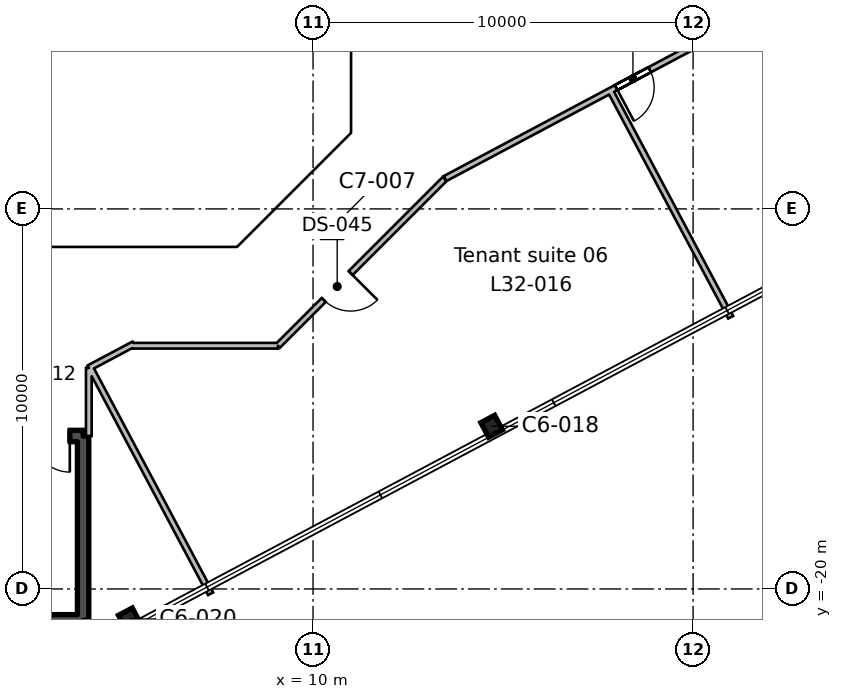
"""IFC4 building model, lengths in metres.
Left out: names, types, materials, properties, quantities, classifications, styles, units other than length and angle.
Written with IfcOpenShell. Run it as: python <this file> out.ifc"""

import sys

from ifc_helpers import new_model, si_unit, direction, frame, frame_2d, origin, origin_2d, place, context, subcontext, project, spatial, rectangle, hollow_rectangle, i_section, extrude, element, fill, save


model = new_model("IFC4")
c1 = context("Model", 3, precision=1e-05, world=origin(), true_north=direction((0.0, 1.0)))
c2 = subcontext(c1, "Body", "Model", "MODEL_VIEW")
j1 = project(units=[si_unit("LENGTHUNIT", "METRE"), si_unit("PLANEANGLEUNIT", "RADIAN")], contexts=[c1])
p1 = place(None, origin())
s1 = spatial("IfcSite", under=j1, at=p1, CompositionType="ELEMENT")
p2 = place(p1, origin())
s2 = spatial("IfcBuilding", under=s1, at=p2, CompositionType="ELEMENT")
p3 = place(p2, frame((0.0, 0.0, 154.2)))
s3 = spatial("IfcBuildingStorey", under=s2, at=p3, CompositionType="ELEMENT", Elevation=154.2)
for number, where, z_axis, x_axis in (
    (1, (5.164, -20.789, 0.0), (0.0, 0.0, 1.0), (0.883, 0.469, 0.0)),
    (2, (14.7, -15.719, 0.0), (0.0, 0.0, 1.0), (0.883, 0.469, 0.0)),
):
    element("IfcColumn", number, at=place(p3, frame(where, z_axis=z_axis, x_axis=x_axis)), inside=s3, PredefinedType="COLUMN", context=c2, shape_type="SweptSolid", body=[
        extrude(i_section(OverallWidth=0.412, OverallDepth=0.434, WebThickness=0.036, FlangeThickness=0.057, FilletRadius=0.015, at=origin_2d()), origin(), (0.0, 0.0, 1.0), 4.0),
    ])
p4 = place(p3, frame((10.5, -10.5, 0.0), z_axis=(0.0, 0.0, 1.0), x_axis=(1.0, 0.0, 0.0)))
e3 = element("IfcColumn", 3, at=p4, inside=s3, PredefinedType="COLUMN", context=c2, shape_type="SweptSolid", body=[
    extrude(hollow_rectangle(XDim=0.508, YDim=0.508, WallThickness=0.012, InnerFilletRadius=0.006, OuterFilletRadius=0.018, at=origin_2d()), origin(), (0.0, 0.0, 1.0), 4.0),
])
p5 = place(p3, frame((3.95, -15.975, 0.0), z_axis=(0.0, 0.0, 1.0), x_axis=(0.0, -1.0, 0.0)))
e4 = element("IfcWall", 4, at=p5, inside=s3, PredefinedType="SHEAR", context=c2, shape_type="SweptSolid", body=[
    extrude(rectangle(XDim=4.85, YDim=0.3, at=frame_2d((2.425, 0.0))), origin(), (0.0, 0.0, 1.0), 4.0),
])
p6 = place(p3, frame((3.95, -20.825, 0.0), z_axis=(0.0, 0.0, 1.0), x_axis=(-1.0, 0.0, 0.0)))
e5 = element("IfcWall", 5, at=p6, inside=s3, PredefinedType="SHEAR", context=c2, shape_type="SweptSolid", body=[
    extrude(rectangle(XDim=8.3, YDim=0.3, at=frame_2d((4.15, 0.0))), origin(), (0.0, 0.0, 1.0), 4.0),
])
p7 = place(p3, frame((-4.35, -15.975, 0.0), z_axis=(0.0, 0.0, 1.0), x_axis=(1.0, 0.0, 0.0)))
e6 = element("IfcWall", 6, at=p7, inside=s3, PredefinedType="SHEAR", context=c2, shape_type="SweptSolid", body=[
    extrude(rectangle(XDim=8.3, YDim=0.3, at=frame_2d((4.15, 0.0))), origin(), (0.0, 0.0, 1.0), 4.0),
])
p8 = place(p7, frame((6.05, 0.0, 0.0)))
e7 = element("IfcOpeningElement", 7, at=p8, cuts=e6, PredefinedType="OPENING", context=c2, shape_type="SweptSolid", body=[
    extrude(rectangle(XDim=1.9, YDim=2.1, at=frame_2d((0.95, 1.05))), frame((0.0, 0.16, 0.0), z_axis=(0.0, -1.0, 0.0), x_axis=(1.0, 0.0, 0.0)), (0.0, 0.0, 1.0), 0.32),
])
p9 = place(p3, frame((5.284, -13.556, 0.0), z_axis=(0.0, 0.0, 1.0), x_axis=(-0.882740669896, -0.469860521551, 0.0)))
e8 = element("IfcWall", 8, at=p9, inside=s3, PredefinedType="PARTITIONING", context=c2, shape_type="SweptSolid", body=[
    extrude(rectangle(XDim=1.341, YDim=0.15, at=frame_2d((0.67, 0.0))), origin(), (0.0, 0.0, 1.0), 3.64),
])
p10 = place(p3, frame((4.1, -14.186, 0.0), z_axis=(0.0, 0.0, 1.0), x_axis=(0.0, -1.0, 0.0)))
e9 = element("IfcWall", 9, at=p10, inside=s3, PredefinedType="PARTITIONING", context=c2, shape_type="SweptSolid", body=[
    extrude(rectangle(XDim=1.789, YDim=0.15, at=frame_2d((0.895, 0.0))), origin(), (0.0, 0.0, 1.0), 3.64),
])
p11 = place(p3, frame((13.461, -9.216, 0.0), z_axis=(0.0, 0.0, 1.0), x_axis=(-0.707106781187, -0.707106781187, 0.0)))
e10 = element("IfcWall", 10, at=p11, inside=s3, PredefinedType="PARTITIONING", context=c2, shape_type="SweptSolid", body=[
    extrude(rectangle(XDim=6.201, YDim=0.15, at=frame_2d((3.1, 0.0))), origin(), (0.0, 0.0, 1.0), 3.64),
])
p12 = place(p11, frame((3.497, 0.0, 0.0)))
e11 = element("IfcOpeningElement", 11, at=p12, cuts=e10, PredefinedType="OPENING", context=c2, shape_type="SweptSolid", body=[
    extrude(rectangle(XDim=1.0, YDim=2.1, at=frame_2d((0.5, 1.05))), frame((0.0, 0.085, 0.0), z_axis=(0.0, -1.0, 0.0), x_axis=(1.0, 0.0, 0.0)), (0.0, 0.0, 1.0), 0.17),
])
p13 = place(p3, frame((9.077, -13.6, 0.0), z_axis=(0.0, 0.0, 1.0), x_axis=(-1.0, 0.0, 0.0)))
e12 = element("IfcWall", 12, at=p13, inside=s3, PredefinedType="PARTITIONING", context=c2, shape_type="SweptSolid", body=[
    extrude(rectangle(XDim=3.837, YDim=0.15, at=frame_2d((1.918, 0.0))), origin(), (0.0, 0.0, 1.0), 3.64),
])
p14 = place(p3, frame((7.304, -20.127, 0.0), z_axis=(0.0, 0.0, 1.0), x_axis=(-0.469356207225, 0.883008918833, 0.0)))
e13 = element("IfcWall", 13, at=p14, inside=s3, PredefinedType="PARTITIONING", context=c2, shape_type="SweptSolid", body=[
    extrude(rectangle(XDim=6.75, YDim=0.15, at=frame_2d((3.375, 0.0))), origin(), (0.0, 0.0, 1.0), 3.64),
])
p15 = place(p3, frame((17.821, -6.89, 0.0), z_axis=(0.0, 0.0, 1.0), x_axis=(0.469454014738, -0.882956923098, 0.0)))
e14 = element("IfcWall", 14, at=p15, inside=s3, PredefinedType="PARTITIONING", context=c2, shape_type="SweptSolid", body=[
    extrude(rectangle(XDim=6.75, YDim=0.15, at=frame_2d((3.375, 0.0))), origin(), (0.0, 0.0, 1.0), 3.64),
])
p16 = place(p3, frame((19.344, -6.08, 0.0), z_axis=(0.0, 0.0, 1.0), x_axis=(-0.882924889458, -0.469514259181, 0.0)))
e15 = element("IfcWall", 15, at=p16, inside=s3, PredefinedType="PARTITIONING", context=c2, shape_type="SweptSolid", body=[
    extrude(rectangle(XDim=6.645, YDim=0.15, at=frame_2d((3.322, 0.0))), origin(), (0.0, 0.0, 1.0), 3.64),
])
p17 = place(p16, frame((0.55, 0.0, 0.0)))
e16 = element("IfcOpeningElement", 16, at=p17, cuts=e15, PredefinedType="OPENING", context=c2, shape_type="SweptSolid", body=[
    extrude(rectangle(XDim=1.0, YDim=2.1, at=frame_2d((0.5, 1.05))), frame((0.0, 0.085, 0.0), z_axis=(0.0, -1.0, 0.0), x_axis=(1.0, 0.0, 0.0)), (0.0, 0.0, 1.0), 0.17),
])
p18 = place(p3, frame((25.723, -2.688, 0.0), z_axis=(0.0, 0.0, 1.0), x_axis=(-0.882926637088, -0.469510972738, 0.0)))
e17 = element("IfcWall", 17, at=p18, inside=s3, PredefinedType="PARTITIONING", context=c2, shape_type="SweptSolid", body=[
    extrude(rectangle(XDim=7.225, YDim=0.15, at=frame_2d((3.612, 0.0))), origin(), (0.0, 0.0, 1.0), 3.64),
])
p19 = place(p8, frame((1.9, 0.0, 0.0), z_axis=(0.0, 0.0, 1.0), x_axis=(-1.0, 0.0, 0.0)))
e18 = element("IfcDoor", 18, at=p19, inside=s3, OperationType="DOUBLE_DOOR_SINGLE_SWING", PredefinedType="DOOR", context=c2, shape_type="SweptSolid", body=[
    extrude(rectangle(XDim=1.9, YDim=2.1, at=frame_2d((0.95, 1.05))), frame((0.0, 0.025, 0.0), z_axis=(0.0, -1.0, 0.0), x_axis=(1.0, 0.0, 0.0)), (0.0, 0.0, 1.0), 0.05),
])
fill(e7, e18)
p20 = place(p12, origin())
e19 = element("IfcDoor", 19, at=p20, inside=s3, OperationType="SINGLE_SWING_LEFT", PredefinedType="DOOR", context=c2, shape_type="SweptSolid", body=[
    extrude(rectangle(XDim=1.0, YDim=2.1, at=frame_2d((0.5, 1.05))), frame((0.0, 0.025, 0.0), z_axis=(0.0, -1.0, 0.0), x_axis=(1.0, 0.0, 0.0)), (0.0, 0.0, 1.0), 0.05),
])
fill(e11, e19)
p21 = place(p17, origin())
e20 = element("IfcDoor", 20, at=p21, inside=s3, OperationType="SINGLE_SWING_RIGHT", PredefinedType="DOOR", context=c2, shape_type="SweptSolid", body=[
    extrude(rectangle(XDim=1.0, YDim=2.1, at=frame_2d((0.5, 1.05))), frame((0.0, 0.025, 0.0), z_axis=(0.0, -1.0, 0.0), x_axis=(1.0, 0.0, 0.0)), (0.0, 0.0, 1.0), 0.05),
])
fill(e16, e20)
save(model, sys.argv[1])
